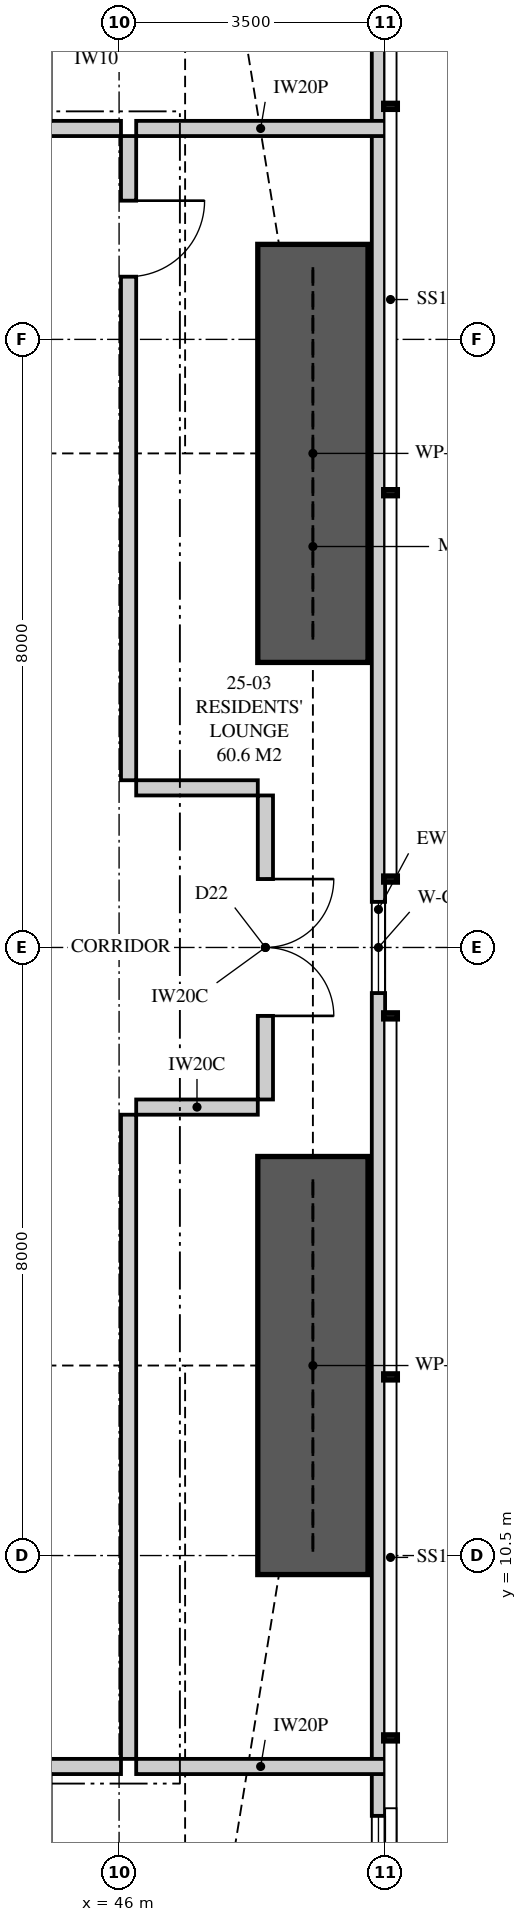
"""IFC4 building model, lengths in metres.
Left out: names, types, materials, properties, quantities, classifications, styles, units other than length and angle.
Written with IfcOpenShell. Run it as: python <this file> out.ifc"""

import sys

from ifc_helpers import new_model, si_unit, direction, frame, frame_2d, origin, place, context, subcontext, project, spatial, polyline, rectangle, outline, extrude, element, fill, save


model = new_model("IFC4")
c1 = context("Model", 3, precision=1e-05, world=origin(), true_north=direction((0.0, 1.0)))
c2 = subcontext(c1, "Body", "Model", "MODEL_VIEW")
j1 = project(units=[si_unit("LENGTHUNIT", "METRE"), si_unit("PLANEANGLEUNIT", "RADIAN")], contexts=[c1])
p1 = place(None, origin())
s1 = spatial("IfcSite", under=j1, at=p1, CompositionType="ELEMENT")
p2 = place(p1, origin())
s2 = spatial("IfcBuilding", under=s1, at=p2, CompositionType="ELEMENT")
p3 = place(p2, frame((0.0, 0.0, 94.8)))
s3 = spatial("IfcBuildingStorey", under=s2, at=p3, CompositionType="ELEMENT", Elevation=94.8)
p4 = place(p3, frame((49.413, 3.051, 0.0), z_axis=(0.0, 0.0, 1.0), x_axis=(0.0, 1.0, 0.0)))
e1 = element("IfcWall", 1, at=p4, inside=s3, PredefinedType="SOLIDWALL", context=c2, shape_type="SweptSolid", body=[
    extrude(outline(polyline([(0.0, 0.0), (31.897, 0.0), (31.897, 3.11), (22.167, 3.11), (22.167, 2.15), (22.074, 2.15), (22.074, 3.11), (21.949, 3.11), (21.949, 2.15), (9.949, 2.15), (9.949, 3.11), (9.823, 3.11), (9.823, 2.15), (9.73, 2.15), (9.73, 3.11), (0.0, 3.11), (0.0, 0.0)])), frame((0.0, 0.087, 0.0), z_axis=(0.0, -1.0, 0.0), x_axis=(1.0, 0.0, 0.0)), (0.0, 0.0, 1.0), 0.175),
])
p5 = place(p4, frame((2.224, 0.0, 0.4)))
e2 = element("IfcOpeningElement", 2, at=p5, cuts=e1, PredefinedType="OPENING", context=c2, shape_type="SweptSolid", body=[
    extrude(rectangle(XDim=1.8, YDim=1.7, at=frame_2d((0.9, 0.85))), frame((0.0, 0.097, 0.0), z_axis=(0.0, -1.0, 0.0), x_axis=(1.0, 0.0, 0.0)), (0.0, 0.0, 1.0), 0.195),
])
p6 = place(p4, frame((14.849, 0.0, 0.4)))
e3 = element("IfcOpeningElement", 3, at=p6, cuts=e1, PredefinedType="OPENING", context=c2, shape_type="SweptSolid", body=[
    extrude(rectangle(XDim=1.2, YDim=1.7, at=frame_2d((0.6, 0.85))), frame((0.0, 0.097, 0.0), z_axis=(0.0, -1.0, 0.0), x_axis=(1.0, 0.0, 0.0)), (0.0, 0.0, 1.0), 0.195),
])
p7 = place(p4, frame((27.373, 0.0, 0.4)))
e4 = element("IfcOpeningElement", 4, at=p7, cuts=e1, PredefinedType="OPENING", context=c2, shape_type="SweptSolid", body=[
    extrude(rectangle(XDim=1.8, YDim=1.7, at=frame_2d((0.9, 0.85))), frame((0.0, 0.097, 0.0), z_axis=(0.0, -1.0, 0.0), x_axis=(1.0, 0.0, 0.0)), (0.0, 0.0, 1.0), 0.195),
])
p8 = place(p3, frame((36.55, 7.725, 0.0), z_axis=(0.0, 0.0, 1.0), x_axis=(1.0, 0.0, 0.0)))
e5 = element("IfcWall", 5, at=p8, inside=s3, PredefinedType="PARTITIONING", context=c2, shape_type="SweptSolid", body=[
    extrude(outline(polyline([(0.0, 0.0), (9.475, 0.0), (9.475, 3.11), (2.412, 3.11), (2.412, 2.541), (1.738, 2.541), (1.738, 3.11), (0.0, 3.11), (0.0, 0.0)])), frame((0.0, 0.1, 0.0), z_axis=(0.0, -1.0, 0.0), x_axis=(1.0, 0.0, 0.0)), (0.0, 0.0, 1.0), 0.2),
])
p9 = place(p8, frame((2.4, 0.0, 0.0)))
e6 = element("IfcOpeningElement", 6, at=p9, cuts=e5, PredefinedType="OPENING", context=c2, shape_type="SweptSolid", body=[
    extrude(rectangle(XDim=1.05, YDim=2.2, at=frame_2d((0.525, 1.1))), frame((0.0, 0.11, 0.0), z_axis=(0.0, -1.0, 0.0), x_axis=(1.0, 0.0, 0.0)), (0.0, 0.0, 1.0), 0.22),
])
p10 = place(p3, frame((46.225, 7.725, 0.0), z_axis=(0.0, 0.0, 1.0), x_axis=(1.0, 0.0, 0.0)))
e7 = element("IfcWall", 7, at=p10, inside=s3, PredefinedType="PARTITIONING", context=c2, shape_type="SweptSolid", body=[
    extrude(outline(polyline([(0.0, 0.0), (3.275, 0.0), (3.275, 3.11), (2.392, 3.11), (2.392, 2.15), (0.643, 2.15), (0.643, 2.541), (0.306, 2.541), (0.306, 3.11), (0.0, 3.11), (0.0, 0.0)])), frame((0.0, 0.1, 0.0), z_axis=(0.0, -1.0, 0.0), x_axis=(1.0, 0.0, 0.0)), (0.0, 0.0, 1.0), 0.2),
])
p11 = place(p3, frame((36.9, 29.275, 0.0), z_axis=(0.0, 0.0, 1.0), x_axis=(1.0, 0.0, 0.0)))
e8 = element("IfcWall", 8, at=p11, inside=s3, PredefinedType="PARTITIONING", context=c2, shape_type="SweptSolid", body=[
    extrude(outline(polyline([(0.0, 0.0), (9.125, 0.0), (9.125, 3.11), (2.062, 3.11), (2.062, 2.541), (1.388, 2.541), (1.388, 3.11), (0.0, 3.11), (0.0, 0.0)])), frame((0.0, 0.1, 0.0), z_axis=(0.0, -1.0, 0.0), x_axis=(1.0, 0.0, 0.0)), (0.0, 0.0, 1.0), 0.2),
])
p12 = place(p11, frame((4.5, 0.0, 0.0)))
e9 = element("IfcOpeningElement", 9, at=p12, cuts=e8, PredefinedType="OPENING", context=c2, shape_type="SweptSolid", body=[
    extrude(rectangle(XDim=1.05, YDim=2.2, at=frame_2d((0.525, 1.1))), frame((0.0, 0.11, 0.0), z_axis=(0.0, -1.0, 0.0), x_axis=(1.0, 0.0, 0.0)), (0.0, 0.0, 1.0), 0.22),
])
p13 = place(p3, frame((46.225, 29.275, 0.0), z_axis=(0.0, 0.0, 1.0), x_axis=(1.0, 0.0, 0.0)))
e10 = element("IfcWall", 10, at=p13, inside=s3, PredefinedType="PARTITIONING", context=c2, shape_type="SweptSolid", body=[
    extrude(outline(polyline([(0.0, 0.0), (3.275, 0.0), (3.275, 3.11), (2.554, 3.11), (2.554, 2.15), (0.805, 2.15), (0.805, 2.541), (0.306, 2.541), (0.306, 3.11), (0.0, 3.11), (0.0, 0.0)])), frame((0.0, 0.1, 0.0), z_axis=(0.0, -1.0, 0.0), x_axis=(1.0, 0.0, 0.0)), (0.0, 0.0, 1.0), 0.2),
])
p14 = place(p3, frame((46.125, 7.825, 0.0), z_axis=(0.0, 0.0, 1.0), x_axis=(0.0, 1.0, 0.0)))
e11 = element("IfcWall", 11, at=p14, inside=s3, PredefinedType="PARTITIONING", context=c2, shape_type="SweptSolid", body=[
    extrude(outline(polyline([(0.0, 0.0), (8.475, 0.0), (8.475, 3.11), (5.512, 3.11), (5.512, 2.541), (4.838, 2.541), (4.838, 3.11), (0.0, 3.11), (0.0, 0.0)])), frame((0.0, 0.1, 0.0), z_axis=(0.0, -1.0, 0.0), x_axis=(1.0, 0.0, 0.0)), (0.0, 0.0, 1.0), 0.2),
])
p15 = place(p3, frame((46.125, 20.7, 0.0), z_axis=(0.0, 0.0, 1.0), x_axis=(0.0, 1.0, 0.0)))
e12 = element("IfcWall", 12, at=p15, inside=s3, PredefinedType="PARTITIONING", context=c2, shape_type="SweptSolid", body=[
    extrude(outline(polyline([(0.0, 0.0), (8.475, 0.0), (8.475, 3.11), (4.637, 3.11), (4.637, 2.541), (3.963, 2.541), (3.963, 3.11), (0.0, 3.11), (0.0, 0.0)])), frame((0.0, 0.1, 0.0), z_axis=(0.0, -1.0, 0.0), x_axis=(1.0, 0.0, 0.0)), (0.0, 0.0, 1.0), 0.2),
])
p16 = place(p15, frame((6.625, 0.0, 0.0)))
e13 = element("IfcOpeningElement", 13, at=p16, cuts=e12, PredefinedType="OPENING", context=c2, shape_type="SweptSolid", body=[
    extrude(rectangle(XDim=1.0, YDim=2.1, at=frame_2d((0.5, 1.05))), frame((0.0, 0.11, 0.0), z_axis=(0.0, -1.0, 0.0), x_axis=(1.0, 0.0, 0.0)), (0.0, 0.0, 1.0), 0.22),
])
p17 = place(p3, frame((47.925, 16.5, 0.0), z_axis=(0.0, 0.0, 1.0), x_axis=(0.0, 1.0, 0.0)))
e14 = element("IfcWall", 14, at=p17, inside=s3, PredefinedType="PARTITIONING", context=c2, shape_type="SweptSolid", body=[
    extrude(outline(polyline([(0.0, 0.0), (4.0, 0.0), (4.0, 3.11), (4.0, 2.15), (0.0, 2.15), (0.0, 3.11), (0.0, 0.0)])), frame((0.0, 0.1, 0.0), z_axis=(0.0, -1.0, 0.0), x_axis=(1.0, 0.0, 0.0)), (0.0, 0.0, 1.0), 0.2),
])
p18 = place(p17, frame((1.1, 0.0, 0.0)))
e15 = element("IfcOpeningElement", 15, at=p18, cuts=e14, PredefinedType="OPENING", context=c2, shape_type="SweptSolid", body=[
    extrude(rectangle(XDim=1.8, YDim=2.1, at=frame_2d((0.9, 1.05))), frame((0.0, 0.11, 0.0), z_axis=(0.0, -1.0, 0.0), x_axis=(1.0, 0.0, 0.0)), (0.0, 0.0, 1.0), 0.22),
])
for number, where, z_axis, x_axis in (
    (16, (46.225, 16.4, 0.0), (0.0, 0.0, 1.0), (1.0, 0.0, 0.0)),
    (17, (46.225, 20.6, 0.0), (0.0, 0.0, 1.0), (1.0, 0.0, 0.0)),
):
    element("IfcWall", number, at=place(p3, frame(where, z_axis=z_axis, x_axis=x_axis)), inside=s3, PredefinedType="PARTITIONING", context=c2, shape_type="SweptSolid", body=[
        extrude(outline(polyline([(0.0, 0.0), (1.6, 0.0), (1.6, 3.11), (1.6, 2.15), (1.415, 2.15), (1.415, 3.11), (0.0, 3.11), (0.0, 0.0)])), frame((0.0, 0.1, 0.0), z_axis=(0.0, -1.0, 0.0), x_axis=(1.0, 0.0, 0.0)), (0.0, 0.0, 1.0), 0.2),
    ])
for number, where, z_axis, x_axis in (
    (18, (48.55, 10.25, 0.0), (0.0, 0.0, 1.0), (0.0, 1.0, 0.0)),
    (19, (48.55, 22.25, 0.0), (0.0, 0.0, 1.0), (0.0, 1.0, 0.0)),
):
    element("IfcWall", number, at=place(p3, frame(where, z_axis=z_axis, x_axis=x_axis)), inside=s3, PredefinedType="SHEAR", context=c2, shape_type="SweptSolid", body=[
        extrude(rectangle(XDim=5.5, YDim=1.45, at=frame_2d((2.75, 0.0))), origin(), (0.0, 0.0, 1.0), 3.35),
    ])
p19 = place(p5, origin())
e20 = element("IfcWindow", 20, at=p19, inside=s3, PartitioningType="SINGLE_PANEL", PredefinedType="WINDOW", context=c2, shape_type="SweptSolid", body=[
    extrude(rectangle(XDim=1.8, YDim=1.7, at=frame_2d((0.9, 0.85))), frame((0.0, 0.03, 0.0), z_axis=(0.0, -1.0, 0.0), x_axis=(1.0, 0.0, 0.0)), (0.0, 0.0, 1.0), 0.06),
])
fill(e2, e20)
p20 = place(p6, origin())
e21 = element("IfcWindow", 21, at=p20, inside=s3, PartitioningType="SINGLE_PANEL", PredefinedType="WINDOW", context=c2, shape_type="SweptSolid", body=[
    extrude(rectangle(XDim=1.2, YDim=1.7, at=frame_2d((0.6, 0.85))), frame((0.0, 0.03, 0.0), z_axis=(0.0, -1.0, 0.0), x_axis=(1.0, 0.0, 0.0)), (0.0, 0.0, 1.0), 0.06),
])
fill(e3, e21)
p21 = place(p18, frame((1.8, 0.0, 0.0), z_axis=(0.0, 0.0, 1.0), x_axis=(-1.0, 0.0, 0.0)))
e22 = element("IfcDoor", 22, at=p21, inside=s3, OperationType="DOUBLE_DOOR_SINGLE_SWING", PredefinedType="DOOR", context=c2, shape_type="SweptSolid", body=[
    extrude(rectangle(XDim=1.8, YDim=2.1, at=frame_2d((0.9, 1.05))), frame((0.0, 0.025, 0.0), z_axis=(0.0, -1.0, 0.0), x_axis=(1.0, 0.0, 0.0)), (0.0, 0.0, 1.0), 0.05),
])
fill(e15, e22)
p22 = place(p16, frame((1.0, 0.0, 0.0), z_axis=(0.0, 0.0, 1.0), x_axis=(-1.0, 0.0, 0.0)))
e23 = element("IfcDoor", 23, at=p22, inside=s3, OperationType="SINGLE_SWING_LEFT", PredefinedType="DOOR", context=c2, shape_type="SweptSolid", body=[
    extrude(rectangle(XDim=1.0, YDim=2.1, at=frame_2d((0.5, 1.05))), frame((0.0, 0.025, 0.0), z_axis=(0.0, -1.0, 0.0), x_axis=(1.0, 0.0, 0.0)), (0.0, 0.0, 1.0), 0.05),
])
fill(e13, e23)
save(model, sys.argv[1])
